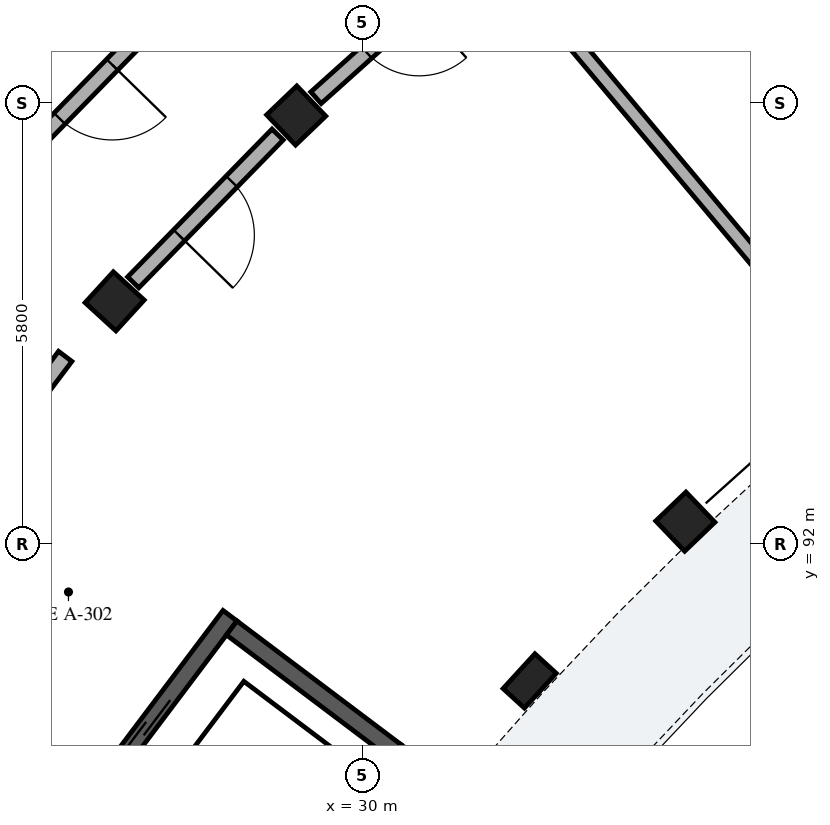
"""IFC4 building model, lengths in metres.
Left out: names, types, materials, properties, quantities, classifications, styles, units other than length and angle.
Written with IfcOpenShell. Run it as: python <this file> out.ifc"""

import sys

from ifc_helpers import new_model, si_unit, direction, frame, frame_2d, origin, origin_2d, place, context, subcontext, project, spatial, rectangle, extrude, element, fill, save


model = new_model("IFC4")
c1 = context("Model", 3, precision=1e-05, world=origin(), true_north=direction((0.0, 1.0)))
c2 = subcontext(c1, "Body", "Model", "MODEL_VIEW")
j1 = project(units=[si_unit("LENGTHUNIT", "METRE"), si_unit("PLANEANGLEUNIT", "RADIAN")], contexts=[c1])
p1 = place(None, origin())
s1 = spatial("IfcSite", under=j1, at=p1, CompositionType="ELEMENT")
p2 = place(p1, origin())
s2 = spatial("IfcBuilding", under=s1, at=p2, CompositionType="ELEMENT")
p3 = place(p2, frame((0.0, 0.0, 8.84)))
s3 = spatial("IfcBuildingStorey", under=s2, at=p3, CompositionType="ELEMENT", Elevation=8.84)
p4 = place(p3, frame((23.125, 90.453, 0.0), z_axis=(0.0, 0.0, 1.0), x_axis=(0.798639633744, -0.601809550782, 0.0)))
e1 = element("IfcWall", 1, at=p4, inside=s3, PredefinedType="SHEAR", context=c2, shape_type="SweptSolid", body=[
    extrude(rectangle(XDim=6.6, YDim=0.28, at=frame_2d((3.3, 0.0))), origin(), (0.0, 0.0, 1.0), 3.11),
])
p5 = place(p4, frame((0.22, 0.0, 0.0)))
e2 = element("IfcOpeningElement", 2, at=p5, cuts=e1, PredefinedType="OPENING", context=c2, shape_type="SweptSolid", body=[
    extrude(rectangle(XDim=1.05, YDim=2.15, at=frame_2d((0.525, 1.075))), frame((0.0, 0.15, 0.0), z_axis=(0.0, -1.0, 0.0), x_axis=(1.0, 0.0, 0.0)), (0.0, 0.0, 1.0), 0.3),
])
p6 = place(p3, frame((26.294, 88.453, 0.0), z_axis=(0.0, 0.0, 1.0), x_axis=(0.601819781152, 0.798631924615, 0.0)))
e3 = element("IfcWall", 3, at=p6, inside=s3, PredefinedType="SHEAR", context=c2, shape_type="SweptSolid", body=[
    extrude(rectangle(XDim=3.26, YDim=0.23, at=frame_2d((1.63, 0.0))), origin(), (0.0, 0.0, 1.0), 3.11),
])
p7 = place(p6, frame((0.9, 0.0, 0.0)))
e4 = element("IfcOpeningElement", 4, at=p7, cuts=e3, PredefinedType="OPENING", context=c2, shape_type="SweptSolid", body=[
    extrude(rectangle(XDim=1.0, YDim=2.15, at=frame_2d((0.5, 1.075))), frame((0.0, 0.125, 0.0), z_axis=(0.0, -1.0, 0.0), x_axis=(1.0, 0.0, 0.0)), (0.0, 0.0, 1.0), 0.25),
])
p8 = place(p3, frame((28.634, 86.69, 0.0), z_axis=(0.0, 0.0, 1.0), x_axis=(0.601819781152, 0.798631924615, 0.0)))
e5 = element("IfcWall", 5, at=p8, inside=s3, PredefinedType="SHEAR", context=c2, shape_type="SweptSolid", body=[
    extrude(rectangle(XDim=3.26, YDim=0.23, at=frame_2d((1.63, 0.0))), origin(), (0.0, 0.0, 1.0), 3.11),
])
p9 = place(p3, frame((28.279, 90.896, 0.0), z_axis=(0.0, 0.0, 1.0), x_axis=(0.798608971494, -0.601850239387, 0.0)))
e6 = element("IfcWall", 6, at=p9, inside=s3, PredefinedType="SHEAR", context=c2, shape_type="SweptSolid", body=[
    extrude(rectangle(XDim=2.7, YDim=0.23, at=frame_2d((1.35, 0.0))), origin(), (0.0, 0.0, 1.0), 3.11),
])
for number, where, z_axis, x_axis in (
    (7, (34.247, 92.294, 0.0), (0.0, 0.0, 1.0), (-0.692, 0.722, 0.0)),
    (8, (29.127, 97.637, 0.0), (0.0, 0.0, 1.0), (-0.692, 0.722, 0.0)),
):
    element("IfcColumn", number, at=place(p3, frame(where, z_axis=z_axis, x_axis=x_axis)), inside=s3, PredefinedType="COLUMN", context=c2, shape_type="SweptSolid", body=[
        extrude(rectangle(XDim=0.55, YDim=0.55, at=origin_2d()), origin(), (0.0, 0.0, 1.0), 3.105),
    ])
p10 = place(p3, frame((32.199, 90.198, 0.0), z_axis=(0.0, 0.0, 1.0), x_axis=(-0.737932089665, 0.674874974378, 0.0)))
e9 = element("IfcColumn", 9, at=p10, inside=s3, PredefinedType="PILASTER", context=c2, shape_type="SweptSolid", body=[
    extrude(rectangle(XDim=0.38, YDim=0.62, at=origin_2d()), origin(), (0.0, 0.0, 1.0), 3.105),
])
p11 = place(p3, frame((26.738, 95.192, 0.0), z_axis=(0.0, 0.0, 1.0), x_axis=(-0.737932089665, 0.674874974378, 0.0)))
e10 = element("IfcColumn", 10, at=p11, inside=s3, PredefinedType="COLUMN", context=c2, shape_type="SweptSolid", body=[
    extrude(rectangle(XDim=0.55, YDim=0.55, at=origin_2d()), origin(), (0.0, 0.0, 1.0), 3.105),
])
p12 = place(p3, frame((23.139, 90.555, 0.0), z_axis=(0.0, 0.0, 1.0), x_axis=(0.601792209296, 0.79865270101, 0.0)))
e11 = element("IfcWall", 11, at=p12, inside=s3, PredefinedType="PARTITIONING", context=c2, shape_type="SweptSolid", body=[
    extrude(rectangle(XDim=4.9, YDim=0.22, at=frame_2d((2.45, 0.0))), origin(), (0.0, 0.0, 1.0), 2.34),
])
p13 = place(p12, frame((1.95, 0.0, 0.0)))
e12 = element("IfcOpeningElement", 12, at=p13, cuts=e11, PredefinedType="OPENING", context=c2, shape_type="SweptSolid", body=[
    extrude(rectangle(XDim=0.98, YDim=2.14, at=frame_2d((0.49, 1.07))), frame((0.0, 0.12, 0.0), z_axis=(0.0, -1.0, 0.0), x_axis=(1.0, 0.0, 0.0)), (0.0, 0.0, 1.0), 0.24),
])
p14 = place(p3, frame((38.497, 96.382, 0.0), z_axis=(0.0, 0.0, 1.0), x_axis=(-0.590924179316, 0.806727100263, 0.0)))
e13 = element("IfcWall", 13, at=p14, inside=s3, PredefinedType="PARTITIONING", context=c2, shape_type="SweptSolid", body=[
    extrude(rectangle(XDim=6.6, YDim=0.125, at=frame_2d((3.3, 0.0))), origin(), (0.0, 0.0, 1.0), 2.37),
])
p15 = place(p14, frame((2.855, 0.0, 0.0)))
e14 = element("IfcOpeningElement", 14, at=p15, cuts=e13, PredefinedType="OPENING", context=c2, shape_type="SweptSolid", body=[
    extrude(rectangle(XDim=0.89, YDim=2.1, at=frame_2d((0.445, 1.05))), frame((0.0, 0.073, 0.0), z_axis=(0.0, -1.0, 0.0), x_axis=(1.0, 0.0, 0.0)), (0.0, 0.0, 1.0), 0.145),
])
p16 = place(p3, frame((36.171, 94.557, 0.0), z_axis=(0.0, 0.0, 1.0), x_axis=(-0.642789470807, 0.766042881449, 0.0)))
e15 = element("IfcWall", 15, at=p16, inside=s3, PredefinedType="PARTITIONING", context=c2, shape_type="SweptSolid", body=[
    extrude(rectangle(XDim=6.6, YDim=0.185, at=frame_2d((3.3, 0.0))), origin(), (0.0, 0.0, 1.0), 2.37),
])
p17 = place(p3, frame((31.411, 99.686, 0.0), z_axis=(0.0, 0.0, 1.0), x_axis=(-0.744418559135, -0.667713268413, 0.0)))
e16 = element("IfcWall", 16, at=p17, inside=s3, PredefinedType="PARTITIONING", context=c2, shape_type="SweptSolid", body=[
    extrude(rectangle(XDim=2.718, YDim=0.205, at=frame_2d((1.359, 0.0))), origin(), (0.0, 0.0, 1.0), 2.37),
])
p18 = place(p17, frame((0.894, 0.0, 0.0)))
e17 = element("IfcOpeningElement", 17, at=p18, cuts=e16, PredefinedType="OPENING", context=c2, shape_type="SweptSolid", body=[
    extrude(rectangle(XDim=0.93, YDim=2.12, at=frame_2d((0.465, 1.06))), frame((0.0, 0.113, 0.0), z_axis=(0.0, -1.0, 0.0), x_axis=(1.0, 0.0, 0.0)), (0.0, 0.0, 1.0), 0.225),
])
p19 = place(p3, frame((27.36, 98.975, 0.0), z_axis=(0.0, 0.0, 1.0), x_axis=(-0.698787219683, -0.715329589496, 0.0)))
e18 = element("IfcWall", 18, at=p19, inside=s3, PredefinedType="PARTITIONING", context=c2, shape_type="SweptSolid", body=[
    extrude(rectangle(XDim=2.863, YDim=0.205, at=frame_2d((1.432, 0.0))), origin(), (0.0, 0.0, 1.0), 2.37),
])
p20 = place(p19, frame((0.937, 0.0, 0.0)))
e19 = element("IfcOpeningElement", 19, at=p20, cuts=e18, PredefinedType="OPENING", context=c2, shape_type="SweptSolid", body=[
    extrude(rectangle(XDim=0.99, YDim=2.16, at=frame_2d((0.495, 1.08))), frame((0.0, 0.113, 0.0), z_axis=(0.0, -1.0, 0.0), x_axis=(1.0, 0.0, 0.0)), (0.0, 0.0, 1.0), 0.225),
])
p21 = place(p3, frame((28.882, 97.387, 0.0), z_axis=(0.0, 0.0, 1.0), x_axis=(-0.698840007829, -0.715278018296, 0.0)))
e20 = element("IfcWall", 20, at=p21, inside=s3, PredefinedType="PARTITIONING", context=c2, shape_type="SweptSolid", body=[
    extrude(rectangle(XDim=2.718, YDim=0.205, at=frame_2d((1.359, 0.0))), origin(), (0.0, 0.0, 1.0), 2.37),
])
p22 = place(p21, frame((0.864, 0.0, 0.0)))
e21 = element("IfcOpeningElement", 21, at=p22, cuts=e20, PredefinedType="OPENING", context=c2, shape_type="SweptSolid", body=[
    extrude(rectangle(XDim=0.99, YDim=2.16, at=frame_2d((0.495, 1.08))), frame((0.0, 0.113, 0.0), z_axis=(0.0, -1.0, 0.0), x_axis=(1.0, 0.0, 0.0)), (0.0, 0.0, 1.0), 0.225),
])
p23 = place(p7, origin())
e22 = element("IfcDoor", 22, at=p23, inside=s3, OperationType="DOUBLE_DOOR_SLIDING", PredefinedType="DOOR", context=c2, shape_type="SweptSolid", body=[
    extrude(rectangle(XDim=1.0, YDim=2.15, at=frame_2d((0.5, 1.075))), frame((0.0, 0.025, 0.0), z_axis=(0.0, -1.0, 0.0), x_axis=(1.0, 0.0, 0.0)), (0.0, 0.0, 1.0), 0.05),
])
fill(e4, e22)
p24 = place(p18, origin())
e23 = element("IfcDoor", 23, at=p24, inside=s3, OperationType="SINGLE_SWING_LEFT", PredefinedType="DOOR", context=c2, shape_type="SweptSolid", body=[
    extrude(rectangle(XDim=0.93, YDim=2.12, at=frame_2d((0.465, 1.06))), frame((0.0, 0.025, 0.0), z_axis=(0.0, -1.0, 0.0), x_axis=(1.0, 0.0, 0.0)), (0.0, 0.0, 1.0), 0.05),
])
fill(e17, e23)
p25 = place(p20, origin())
e24 = element("IfcDoor", 24, at=p25, inside=s3, OperationType="SINGLE_SWING_LEFT", PredefinedType="DOOR", context=c2, shape_type="SweptSolid", body=[
    extrude(rectangle(XDim=0.99, YDim=2.16, at=frame_2d((0.495, 1.08))), frame((0.0, 0.025, 0.0), z_axis=(0.0, -1.0, 0.0), x_axis=(1.0, 0.0, 0.0)), (0.0, 0.0, 1.0), 0.05),
])
fill(e19, e24)
p26 = place(p22, origin())
e25 = element("IfcDoor", 25, at=p26, inside=s3, OperationType="SINGLE_SWING_RIGHT", PredefinedType="DOOR", context=c2, shape_type="SweptSolid", body=[
    extrude(rectangle(XDim=0.99, YDim=2.16, at=frame_2d((0.495, 1.08))), frame((0.0, 0.025, 0.0), z_axis=(0.0, -1.0, 0.0), x_axis=(1.0, 0.0, 0.0)), (0.0, 0.0, 1.0), 0.05),
])
fill(e21, e25)
save(model, sys.argv[1])
